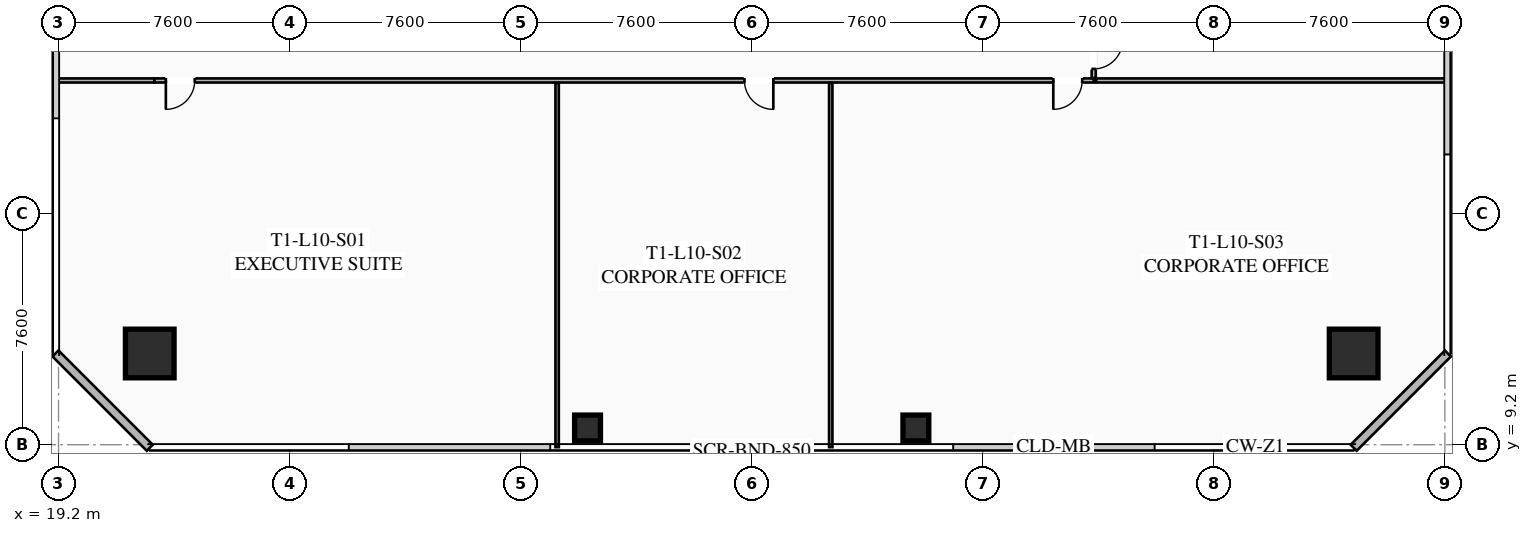
"""IFC4 building model, lengths in metres.
Left out: names, types, materials, properties, quantities, classifications, styles, units other than length and angle.
Written with IfcOpenShell. Run it as: python <this file> out.ifc"""

import sys

from ifc_helpers import new_model, si_unit, direction, frame, frame_2d, origin, origin_2d, place, context, subcontext, project, spatial, rectangle, hollow_rectangle, extrude, element, fill, save


model = new_model("IFC4")
c1 = context("Model", 3, precision=1e-05, world=origin(), true_north=direction((0.0, 1.0)))
c2 = subcontext(c1, "Body", "Model", "MODEL_VIEW")
j1 = project(units=[si_unit("LENGTHUNIT", "METRE"), si_unit("PLANEANGLEUNIT", "RADIAN")], contexts=[c1])
p1 = place(None, origin())
s1 = spatial("IfcSite", under=j1, at=p1, CompositionType="ELEMENT")
p2 = place(p1, origin())
s2 = spatial("IfcBuilding", under=s1, at=p2, CompositionType="ELEMENT")
p3 = place(p2, frame((0.0, 0.0, 42.35)))
s3 = spatial("IfcBuildingStorey", under=s2, at=p3, CompositionType="ELEMENT", Elevation=42.35)
for number, where, z_axis, x_axis in (
    (1, (22.2, 12.2, 0.0), (0.0, 0.0, 1.0), (1.0, 0.0, 0.0)),
    (2, (61.8, 12.2, 0.0), (0.0, 0.0, 1.0), (1.0, 0.0, 0.0)),
):
    element("IfcColumn", number, at=place(p3, frame(where, z_axis=z_axis, x_axis=x_axis)), inside=s3, PredefinedType="COLUMN", context=c2, shape_type="SweptSolid", body=[
        extrude(hollow_rectangle(XDim=1.6, YDim=1.6, WallThickness=0.06, at=origin_2d()), origin(), (0.0, 0.0, 1.0), 3.35),
    ])
for number, where, z_axis, x_axis in (
    (3, (36.6, 9.75, 0.0), (0.0, 0.0, 1.0), (1.0, 0.0, 0.0)),
    (4, (47.4, 9.75, 0.0), (0.0, 0.0, 1.0), (1.0, 0.0, 0.0)),
):
    element("IfcColumn", number, at=place(p3, frame(where, z_axis=z_axis, x_axis=x_axis)), inside=s3, PredefinedType="COLUMN", context=c2, shape_type="SweptSolid", body=[
        extrude(hollow_rectangle(XDim=0.85, YDim=0.85, WallThickness=0.035, at=origin_2d()), origin(), (0.0, 0.0, 1.0), 3.35),
    ])
for number, where, z_axis, x_axis in (
    (5, (22.2, 9.1, 0.0), (0.0, 0.0, 1.0), (-0.707, 0.707, 0.0)),
    (6, (64.9, 12.2, 0.0), (0.0, 0.0, 1.0), (-0.707, -0.707, 0.0)),
):
    element("IfcWall", number, at=place(p3, frame(where, z_axis=z_axis, x_axis=x_axis)), inside=s3, PredefinedType="SOLIDWALL", context=c2, shape_type="SweptSolid", body=[
        extrude(rectangle(XDim=4.384, YDim=0.28, at=frame_2d((2.192, 0.0))), origin(), (0.0, 0.0, 1.0), 3.35),
    ])
p4 = place(p3, frame((53.25, 21.18, 0.0), z_axis=(0.0, 0.0, 1.0), x_axis=(-1.0, 0.0, 0.0)))
e7 = element("IfcWall", 7, at=p4, inside=s3, PredefinedType="PARTITIONING", context=c2, shape_type="SweptSolid", body=[
    extrude(rectangle(XDim=30.9, YDim=0.135, at=frame_2d((15.45, 0.0))), origin(), (0.0, 0.0, 1.0), 2.703),
])
p5 = place(p4, frame((29.57, 0.0, 0.0)))
e8 = element("IfcOpeningElement", 8, at=p5, cuts=e7, PredefinedType="OPENING", context=c2, shape_type="SweptSolid", body=[
    extrude(rectangle(XDim=0.95, YDim=2.05, at=frame_2d((0.475, 1.025))), frame((0.0, 0.077, 0.0), z_axis=(0.0, -1.0, 0.0), x_axis=(1.0, 0.0, 0.0)), (0.0, 0.0, 1.0), 0.155),
])
p6 = place(p4, frame((10.538, 0.0, 0.0)))
e9 = element("IfcOpeningElement", 9, at=p6, cuts=e7, PredefinedType="OPENING", context=c2, shape_type="SweptSolid", body=[
    extrude(rectangle(XDim=0.95, YDim=2.05, at=frame_2d((0.475, 1.025))), frame((0.0, 0.077, 0.0), z_axis=(0.0, -1.0, 0.0), x_axis=(1.0, 0.0, 0.0)), (0.0, 0.0, 1.0), 0.155),
])
p7 = place(p4, frame((0.38, 0.0, 0.0)))
e10 = element("IfcOpeningElement", 10, at=p7, cuts=e7, PredefinedType="OPENING", context=c2, shape_type="SweptSolid", body=[
    extrude(rectangle(XDim=0.95, YDim=2.05, at=frame_2d((0.475, 1.025))), frame((0.0, 0.077, 0.0), z_axis=(0.0, -1.0, 0.0), x_axis=(1.0, 0.0, 0.0)), (0.0, 0.0, 1.0), 0.155),
])
p8 = place(p3, frame((19.12, 21.18, 0.0), z_axis=(0.0, 0.0, 1.0), x_axis=(1.0, 0.0, 0.0)))
e11 = element("IfcWall", 11, at=p8, inside=s3, PredefinedType="PARTITIONING", context=c2, shape_type="SweptSolid", body=[
    extrude(rectangle(XDim=3.23, YDim=0.135, at=frame_2d((1.615, 0.0))), origin(), (0.0, 0.0, 1.0), 2.703),
])
for number, where, z_axis, x_axis in (
    (12, (35.6, 9.12, 0.0), (0.0, 0.0, 1.0), (0.0, 1.0, 0.0)),
    (13, (44.6, 9.12, 0.0), (0.0, 0.0, 1.0), (0.0, 1.0, 0.0)),
):
    element("IfcWall", number, at=place(p3, frame(where, z_axis=z_axis, x_axis=x_axis)), inside=s3, PredefinedType="PARTITIONING", context=c2, shape_type="SweptSolid", body=[
        extrude(rectangle(XDim=11.98, YDim=0.11, at=frame_2d((5.99, 0.0))), origin(), (0.0, 0.0, 1.0), 2.703),
    ])
p9 = place(p3, frame((53.25, 41.37, 0.0), z_axis=(0.0, 0.0, 1.0), x_axis=(0.0, -1.0, 0.0)))
e14 = element("IfcWall", 14, at=p9, inside=s3, PredefinedType="PARTITIONING", context=c2, shape_type="SweptSolid", body=[
    extrude(rectangle(XDim=20.11, YDim=0.135, at=frame_2d((10.055, 0.0))), origin(), (0.0, 0.0, 1.0), 2.703),
])
p10 = place(p9, frame((18.86, 0.0, 0.0)))
e15 = element("IfcOpeningElement", 15, at=p10, cuts=e14, PredefinedType="OPENING", context=c2, shape_type="SweptSolid", body=[
    extrude(rectangle(XDim=0.95, YDim=2.05, at=frame_2d((0.475, 1.025))), frame((0.0, 0.077, 0.0), z_axis=(0.0, -1.0, 0.0), x_axis=(1.0, 0.0, 0.0)), (0.0, 0.0, 1.0), 0.155),
])
p11 = place(p3, frame((53.33, 21.18, 0.0), z_axis=(0.0, 0.0, 1.0), x_axis=(1.0, 0.0, 0.0)))
e16 = element("IfcWall", 16, at=p11, inside=s3, PredefinedType="PARTITIONING", context=c2, shape_type="SweptSolid", body=[
    extrude(rectangle(XDim=11.55, YDim=0.135, at=frame_2d((5.775, 0.0))), origin(), (0.0, 0.0, 1.0), 2.703),
])
p12 = place(p5, origin())
e17 = element("IfcDoor", 17, at=p12, inside=s3, OperationType="SINGLE_SWING_RIGHT", PredefinedType="DOOR", context=c2, shape_type="SweptSolid", body=[
    extrude(rectangle(XDim=0.95, YDim=2.05, at=frame_2d((0.475, 1.025))), frame((0.0, 0.025, 0.0), z_axis=(0.0, -1.0, 0.0), x_axis=(1.0, 0.0, 0.0)), (0.0, 0.0, 1.0), 0.05),
])
fill(e8, e17)
p13 = place(p6, origin())
e18 = element("IfcDoor", 18, at=p13, inside=s3, OperationType="SINGLE_SWING_LEFT", PredefinedType="DOOR", context=c2, shape_type="SweptSolid", body=[
    extrude(rectangle(XDim=0.95, YDim=2.05, at=frame_2d((0.475, 1.025))), frame((0.0, 0.025, 0.0), z_axis=(0.0, -1.0, 0.0), x_axis=(1.0, 0.0, 0.0)), (0.0, 0.0, 1.0), 0.05),
])
fill(e9, e18)
p14 = place(p7, origin())
e19 = element("IfcDoor", 19, at=p14, inside=s3, OperationType="SINGLE_SWING_RIGHT", PredefinedType="DOOR", context=c2, shape_type="SweptSolid", body=[
    extrude(rectangle(XDim=0.95, YDim=2.05, at=frame_2d((0.475, 1.025))), frame((0.0, 0.025, 0.0), z_axis=(0.0, -1.0, 0.0), x_axis=(1.0, 0.0, 0.0)), (0.0, 0.0, 1.0), 0.05),
])
fill(e10, e19)
p15 = place(p10, origin())
e20 = element("IfcDoor", 20, at=p15, inside=s3, OperationType="SINGLE_SWING_LEFT", PredefinedType="DOOR", context=c2, shape_type="SweptSolid", body=[
    extrude(rectangle(XDim=0.95, YDim=2.05, at=frame_2d((0.475, 1.025))), frame((0.0, 0.025, 0.0), z_axis=(0.0, -1.0, 0.0), x_axis=(1.0, 0.0, 0.0)), (0.0, 0.0, 1.0), 0.05),
])
fill(e15, e20)
save(model, sys.argv[1])
